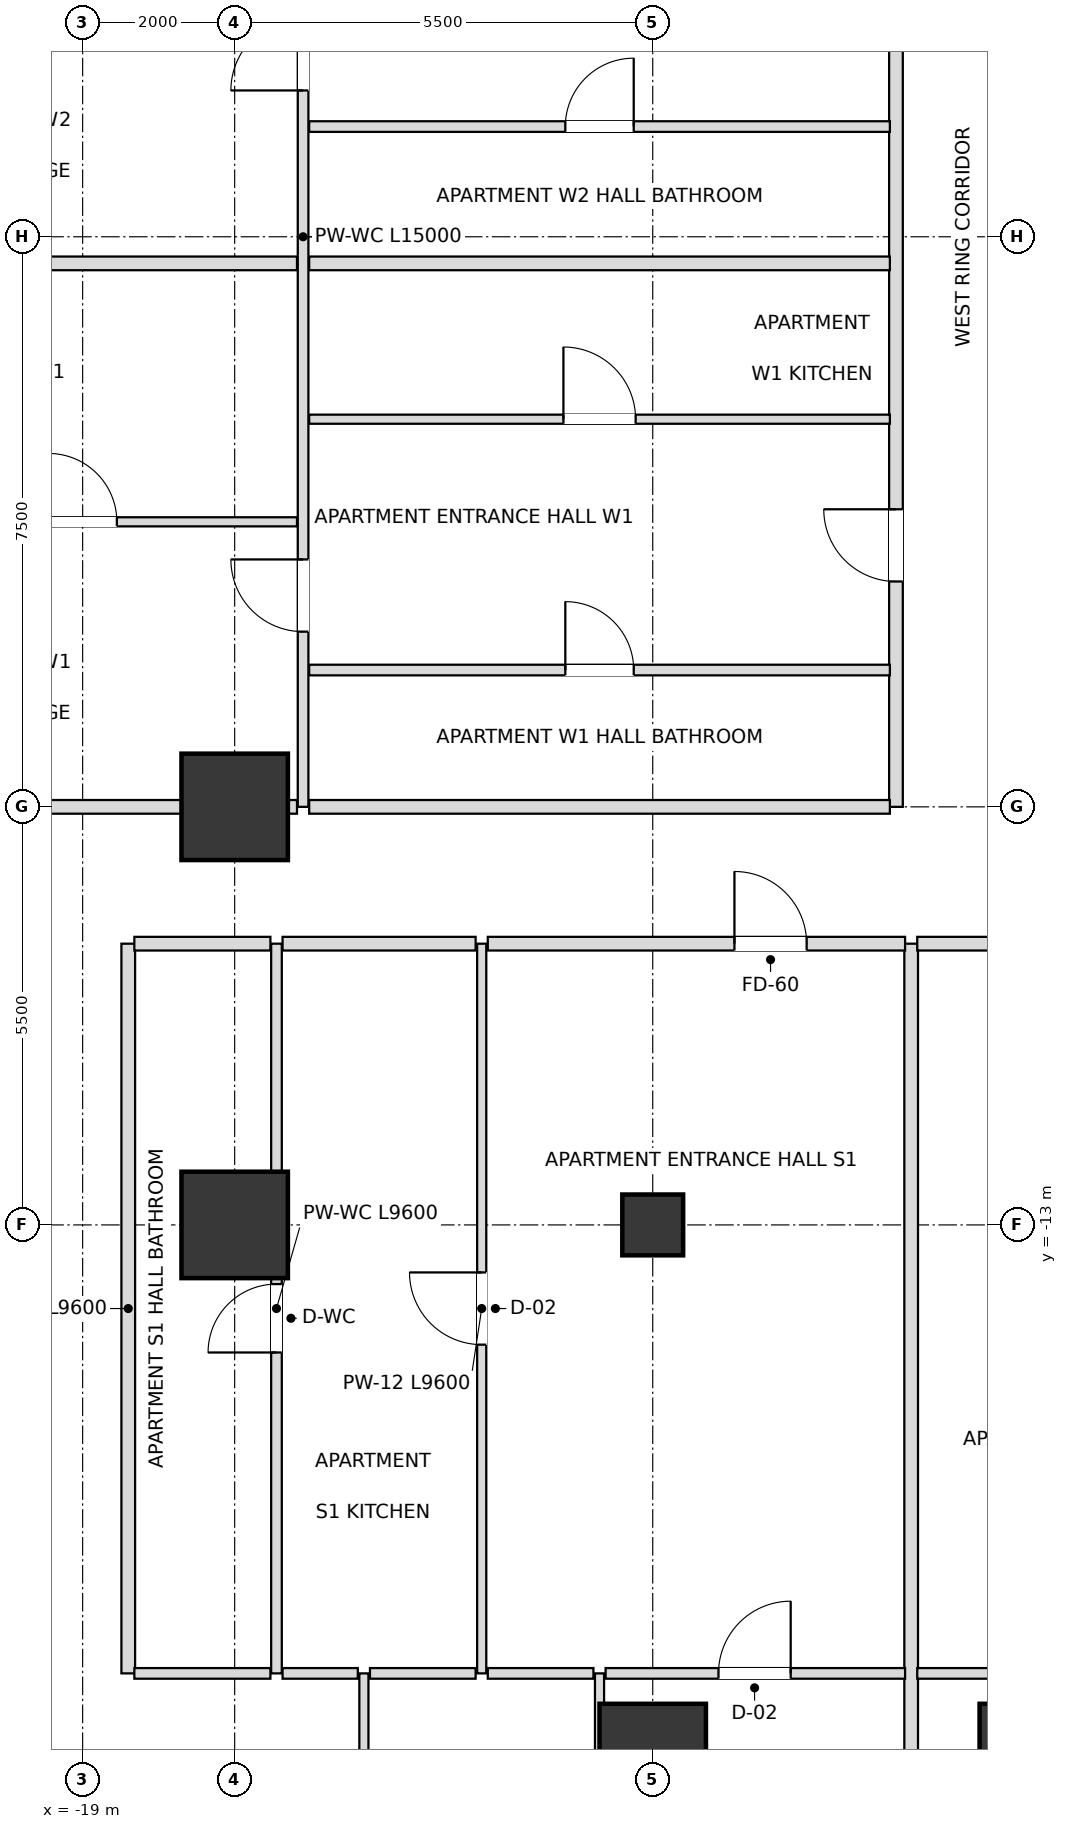
"""IFC4 building model, lengths in metres.
Left out: names, types, materials, properties, quantities, classifications, styles, units other than length and angle.
Written with IfcOpenShell. Run it as: python <this file> out.ifc"""

import sys

from ifc_helpers import new_model, si_unit, direction, frame, frame_2d, origin, origin_2d, place, context, subcontext, project, spatial, rectangle, extrude, element, fill, save


model = new_model("IFC4")
c1 = context("Model", 3, precision=1e-05, world=origin(), true_north=direction((0.0, 1.0)))
c2 = subcontext(c1, "Body", "Model", "MODEL_VIEW")
j1 = project(units=[si_unit("LENGTHUNIT", "METRE"), si_unit("PLANEANGLEUNIT", "RADIAN")], contexts=[c1])
p1 = place(None, origin())
s1 = spatial("IfcSite", under=j1, at=p1, CompositionType="ELEMENT")
p2 = place(p1, origin())
s2 = spatial("IfcBuilding", under=s1, at=p2, CompositionType="ELEMENT")
p3 = place(p2, frame((0.0, 0.0, 32.4)))
s3 = spatial("IfcBuildingStorey", under=s2, at=p3, CompositionType="ELEMENT", Elevation=32.4)
for number, where, z_axis, x_axis in (
    (1, (-11.5, -20.0, 0.0), (0.0, 0.0, 1.0), (1.0, 0.0, 0.0)),
    (2, (-6.5, -20.0, 0.0), (0.0, 0.0, 1.0), (1.0, 0.0, 0.0)),
    (3, (-17.0, -7.5, 0.0), (0.0, 0.0, 1.0), (1.0, 0.0, 0.0)),
    (4, (-17.0, -13.0, 0.0), (0.0, 0.0, 1.0), (1.0, 0.0, 0.0)),
):
    element("IfcColumn", number, at=place(p3, frame(where, z_axis=z_axis, x_axis=x_axis)), inside=s3, PredefinedType="USERDEFINED", context=c2, shape_type="SweptSolid", body=[
        extrude(rectangle(XDim=1.4, YDim=1.4, at=origin_2d()), origin(), (0.0, 0.0, 1.0), 3.6),
    ])
p4 = place(p3, frame((-11.5, -13.0, 0.0), z_axis=(0.0, 0.0, 1.0), x_axis=(1.0, 0.0, 0.0)))
e5 = element("IfcColumn", 5, at=p4, inside=s3, PredefinedType="COLUMN", context=c2, shape_type="SweptSolid", body=[
    extrude(rectangle(XDim=0.8, YDim=0.8, at=origin_2d()), origin(), (0.0, 0.0, 1.0), 3.6),
])
p5 = place(p3, frame((-18.4, -18.9, 0.0), z_axis=(0.0, 0.0, 1.0), x_axis=(0.0, 1.0, 0.0)))
e6 = element("IfcWall", 6, at=p5, inside=s3, PredefinedType="PARTITIONING", context=c2, shape_type="SweptSolid", body=[
    extrude(rectangle(XDim=9.6, YDim=0.18, at=frame_2d((4.8, 0.0))), origin(), (0.0, 0.0, 1.0), 2.736),
])
p6 = place(p3, frame((-16.45, -18.9, 0.0), z_axis=(0.0, 0.0, 1.0), x_axis=(0.0, 1.0, 0.0)))
e7 = element("IfcWall", 7, at=p6, inside=s3, PredefinedType="PARTITIONING", context=c2, shape_type="SweptSolid", body=[
    extrude(rectangle(XDim=9.6, YDim=0.14, at=frame_2d((4.8, 0.0))), origin(), (0.0, 0.0, 1.0), 2.736),
])
p7 = place(p6, frame((4.222, 0.0, 0.0)))
e8 = element("IfcOpeningElement", 8, at=p7, cuts=e7, PredefinedType="OPENING", context=c2, shape_type="SweptSolid", body=[
    extrude(rectangle(XDim=0.9, YDim=2.1, at=frame_2d((0.45, 1.05))), frame((0.0, 0.08, 0.0), z_axis=(0.0, -1.0, 0.0), x_axis=(1.0, 0.0, 0.0)), (0.0, 0.0, 1.0), 0.16),
])
p8 = place(p3, frame((-16.1, -7.5, 0.0), z_axis=(0.0, 0.0, 1.0), x_axis=(0.0, 1.0, 0.0)))
e9 = element("IfcWall", 9, at=p8, inside=s3, PredefinedType="PARTITIONING", context=c2, shape_type="SweptSolid", body=[
    extrude(rectangle(XDim=15.0, YDim=0.14, at=frame_2d((7.5, 0.0))), origin(), (0.0, 0.0, 1.0), 3.38),
])
p9 = place(p8, frame((2.305, 0.0, 0.0)))
e10 = element("IfcOpeningElement", 10, at=p9, cuts=e9, PredefinedType="OPENING", context=c2, shape_type="SweptSolid", body=[
    extrude(rectangle(XDim=0.95, YDim=2.1, at=frame_2d((0.475, 1.05))), frame((0.0, 0.08, 0.0), z_axis=(0.0, -1.0, 0.0), x_axis=(1.0, 0.0, 0.0)), (0.0, 0.0, 1.0), 0.16),
])
p10 = place(p8, frame((9.425, 0.0, 0.0)))
e11 = element("IfcOpeningElement", 11, at=p10, cuts=e9, PredefinedType="OPENING", context=c2, shape_type="SweptSolid", body=[
    extrude(rectangle(XDim=0.95, YDim=2.1, at=frame_2d((0.475, 1.05))), frame((0.0, 0.08, 0.0), z_axis=(0.0, -1.0, 0.0), x_axis=(1.0, 0.0, 0.0)), (0.0, 0.0, 1.0), 0.16),
])
p11 = place(p3, frame((-15.3, -24.9, 0.0), z_axis=(0.0, 0.0, 1.0), x_axis=(0.0, 1.0, 0.0)))
e12 = element("IfcWall", 12, at=p11, inside=s3, PredefinedType="PARTITIONING", context=c2, shape_type="SweptSolid", body=[
    extrude(rectangle(XDim=6.0, YDim=0.12, at=frame_2d((3.0, 0.0))), origin(), (0.0, 0.0, 1.0), 2.736),
])
p12 = place(p11, frame((2.55, 0.0, 0.0)))
e13 = element("IfcOpeningElement", 13, at=p12, cuts=e12, PredefinedType="OPENING", context=c2, shape_type="SweptSolid", body=[
    extrude(rectangle(XDim=0.9, YDim=2.1, at=frame_2d((0.45, 1.05))), frame((0.0, 0.07, 0.0), z_axis=(0.0, -1.0, 0.0), x_axis=(1.0, 0.0, 0.0)), (0.0, 0.0, 1.0), 0.14),
])
p13 = place(p3, frame((-13.75, -18.9, 0.0), z_axis=(0.0, 0.0, 1.0), x_axis=(0.0, 1.0, 0.0)))
e14 = element("IfcWall", 14, at=p13, inside=s3, PredefinedType="PARTITIONING", context=c2, shape_type="SweptSolid", body=[
    extrude(rectangle(XDim=9.6, YDim=0.12, at=frame_2d((4.8, 0.0))), origin(), (0.0, 0.0, 1.0), 2.736),
])
p14 = place(p13, frame((4.325, 0.0, 0.0)))
e15 = element("IfcOpeningElement", 15, at=p14, cuts=e14, PredefinedType="OPENING", context=c2, shape_type="SweptSolid", body=[
    extrude(rectangle(XDim=0.95, YDim=2.1, at=frame_2d((0.475, 1.05))), frame((0.0, 0.07, 0.0), z_axis=(0.0, -1.0, 0.0), x_axis=(1.0, 0.0, 0.0)), (0.0, 0.0, 1.0), 0.14),
])
p15 = place(p3, frame((-12.2, -24.9, 0.0), z_axis=(0.0, 0.0, 1.0), x_axis=(0.0, 1.0, 0.0)))
e16 = element("IfcWall", 16, at=p15, inside=s3, PredefinedType="PARTITIONING", context=c2, shape_type="SweptSolid", body=[
    extrude(rectangle(XDim=6.0, YDim=0.12, at=frame_2d((3.0, 0.0))), origin(), (0.0, 0.0, 1.0), 2.736),
])
p16 = place(p15, frame((2.55, 0.0, 0.0)))
e17 = element("IfcOpeningElement", 17, at=p16, cuts=e16, PredefinedType="OPENING", context=c2, shape_type="SweptSolid", body=[
    extrude(rectangle(XDim=0.9, YDim=2.1, at=frame_2d((0.45, 1.05))), frame((0.0, 0.07, 0.0), z_axis=(0.0, -1.0, 0.0), x_axis=(1.0, 0.0, 0.0)), (0.0, 0.0, 1.0), 0.14),
])
p17 = place(p3, frame((-8.3, -7.5, 0.0), z_axis=(0.0, 0.0, 1.0), x_axis=(0.0, 1.0, 0.0)))
e18 = element("IfcWall", 18, at=p17, inside=s3, PredefinedType="PARTITIONING", context=c2, shape_type="SweptSolid", body=[
    extrude(rectangle(XDim=15.0, YDim=0.18, at=frame_2d((7.5, 0.0))), origin(), (0.0, 0.0, 1.0), 3.38),
])
p18 = place(p17, frame((2.965, 0.0, 0.0)))
e19 = element("IfcOpeningElement", 19, at=p18, cuts=e18, PredefinedType="OPENING", context=c2, shape_type="SweptSolid", body=[
    extrude(rectangle(XDim=0.95, YDim=2.15, at=frame_2d((0.475, 1.075))), frame((0.0, 0.1, 0.0), z_axis=(0.0, -1.0, 0.0), x_axis=(1.0, 0.0, 0.0)), (0.0, 0.0, 1.0), 0.2),
])
p19 = place(p17, frame((10.465, 0.0, 0.0)))
e20 = element("IfcOpeningElement", 20, at=p19, cuts=e18, PredefinedType="OPENING", context=c2, shape_type="SweptSolid", body=[
    extrude(rectangle(XDim=0.95, YDim=2.15, at=frame_2d((0.475, 1.075))), frame((0.0, 0.1, 0.0), z_axis=(0.0, -1.0, 0.0), x_axis=(1.0, 0.0, 0.0)), (0.0, 0.0, 1.0), 0.2),
])
p20 = place(p3, frame((-8.1, -24.9, 0.0), z_axis=(0.0, 0.0, 1.0), x_axis=(0.0, 1.0, 0.0)))
e21 = element("IfcWall", 21, at=p20, inside=s3, PredefinedType="PARTITIONING", context=c2, shape_type="SweptSolid", body=[
    extrude(rectangle(XDim=15.6, YDim=0.18, at=frame_2d((7.8, 0.0))), origin(), (0.0, 0.0, 1.0), 2.816),
])
p21 = place(p3, frame((-18.32, -18.9, 0.0), z_axis=(0.0, 0.0, 1.0), x_axis=(1.0, 0.0, 0.0)))
e22 = element("IfcWall", 22, at=p21, inside=s3, PredefinedType="PARTITIONING", context=c2, shape_type="SweptSolid", body=[
    extrude(rectangle(XDim=1.79, YDim=0.14, at=frame_2d((0.895, 0.0))), origin(), (0.0, 0.0, 1.0), 2.736),
])
p22 = place(p3, frame((-16.37, -18.9, 0.0), z_axis=(0.0, 0.0, 1.0), x_axis=(1.0, 0.0, 0.0)))
e23 = element("IfcWall", 23, at=p22, inside=s3, PredefinedType="PARTITIONING", context=c2, shape_type="SweptSolid", body=[
    extrude(rectangle(XDim=0.99, YDim=0.14, at=frame_2d((0.495, 0.0))), origin(), (0.0, 0.0, 1.0), 2.736),
])
for number, where, z_axis, x_axis in (
    (24, (-15.22, -18.9, 0.0), (0.0, 0.0, 1.0), (1.0, 0.0, 0.0)),
    (25, (-13.67, -18.9, 0.0), (0.0, 0.0, 1.0), (1.0, 0.0, 0.0)),
):
    element("IfcWall", number, at=place(p3, frame(where, z_axis=z_axis, x_axis=x_axis)), inside=s3, PredefinedType="PARTITIONING", context=c2, shape_type="SweptSolid", body=[
        extrude(rectangle(XDim=1.39, YDim=0.14, at=frame_2d((0.695, 0.0))), origin(), (0.0, 0.0, 1.0), 2.736),
    ])
p23 = place(p3, frame((-12.12, -18.9, 0.0), z_axis=(0.0, 0.0, 1.0), x_axis=(1.0, 0.0, 0.0)))
e26 = element("IfcWall", 26, at=p23, inside=s3, PredefinedType="PARTITIONING", context=c2, shape_type="SweptSolid", body=[
    extrude(rectangle(XDim=3.94, YDim=0.14, at=frame_2d((1.97, 0.0))), origin(), (0.0, 0.0, 1.0), 2.736),
])
p24 = place(p23, frame((1.485, 0.0, 0.0)))
e27 = element("IfcOpeningElement", 27, at=p24, cuts=e26, PredefinedType="OPENING", context=c2, shape_type="SweptSolid", body=[
    extrude(rectangle(XDim=0.95, YDim=2.1, at=frame_2d((0.475, 1.05))), frame((0.0, 0.08, 0.0), z_axis=(0.0, -1.0, 0.0), x_axis=(1.0, 0.0, 0.0)), (0.0, 0.0, 1.0), 0.16),
])
p25 = place(p3, frame((-8.02, -18.9, 0.0), z_axis=(0.0, 0.0, 1.0), x_axis=(1.0, 0.0, 0.0)))
e28 = element("IfcWall", 28, at=p25, inside=s3, PredefinedType="PARTITIONING", context=c2, shape_type="SweptSolid", body=[
    extrude(rectangle(XDim=4.04, YDim=0.14, at=frame_2d((2.02, 0.0))), origin(), (0.0, 0.0, 1.0), 2.816),
])
p26 = place(p25, frame((2.452, 0.0, 0.0)))
e29 = element("IfcOpeningElement", 29, at=p26, cuts=e28, PredefinedType="OPENING", context=c2, shape_type="SweptSolid", body=[
    extrude(rectangle(XDim=0.95, YDim=2.1, at=frame_2d((0.475, 1.05))), frame((0.0, 0.08, 0.0), z_axis=(0.0, -1.0, 0.0), x_axis=(1.0, 0.0, 0.0)), (0.0, 0.0, 1.0), 0.16),
])
p27 = place(p3, frame((-18.32, -9.3, 0.0), z_axis=(0.0, 0.0, 1.0), x_axis=(1.0, 0.0, 0.0)))
e30 = element("IfcWall", 30, at=p27, inside=s3, PredefinedType="PARTITIONING", context=c2, shape_type="SweptSolid", body=[
    extrude(rectangle(XDim=1.79, YDim=0.18, at=frame_2d((0.895, 0.0))), origin(), (0.0, 0.0, 1.0), 2.816),
])
p28 = place(p3, frame((-16.37, -9.3, 0.0), z_axis=(0.0, 0.0, 1.0), x_axis=(1.0, 0.0, 0.0)))
e31 = element("IfcWall", 31, at=p28, inside=s3, PredefinedType="PARTITIONING", context=c2, shape_type="SweptSolid", body=[
    extrude(rectangle(XDim=2.54, YDim=0.18, at=frame_2d((1.27, 0.0))), origin(), (0.0, 0.0, 1.0), 3.38),
])
p29 = place(p3, frame((-13.67, -9.3, 0.0), z_axis=(0.0, 0.0, 1.0), x_axis=(1.0, 0.0, 0.0)))
e32 = element("IfcWall", 32, at=p29, inside=s3, PredefinedType="PARTITIONING", context=c2, shape_type="SweptSolid", body=[
    extrude(rectangle(XDim=5.49, YDim=0.18, at=frame_2d((2.745, 0.0))), origin(), (0.0, 0.0, 1.0), 3.38),
])
p30 = place(p29, frame((3.245, 0.0, 0.0)))
e33 = element("IfcOpeningElement", 33, at=p30, cuts=e32, PredefinedType="OPENING", context=c2, shape_type="SweptSolid", body=[
    extrude(rectangle(XDim=0.95, YDim=2.15, at=frame_2d((0.475, 1.075))), frame((0.0, 0.1, 0.0), z_axis=(0.0, -1.0, 0.0), x_axis=(1.0, 0.0, 0.0)), (0.0, 0.0, 1.0), 0.2),
])
p31 = place(p3, frame((-8.02, -9.3, 0.0), z_axis=(0.0, 0.0, 1.0), x_axis=(1.0, 0.0, 0.0)))
e34 = element("IfcWall", 34, at=p31, inside=s3, PredefinedType="PARTITIONING", context=c2, shape_type="SweptSolid", body=[
    extrude(rectangle(XDim=4.04, YDim=0.18, at=frame_2d((2.02, 0.0))), origin(), (0.0, 0.0, 1.0), 2.816),
])
p32 = place(p31, frame((1.545, 0.0, 0.0)))
e35 = element("IfcOpeningElement", 35, at=p32, cuts=e34, PredefinedType="OPENING", context=c2, shape_type="SweptSolid", body=[
    extrude(rectangle(XDim=0.95, YDim=2.15, at=frame_2d((0.475, 1.075))), frame((0.0, 0.1, 0.0), z_axis=(0.0, -1.0, 0.0), x_axis=(1.0, 0.0, 0.0)), (0.0, 0.0, 1.0), 0.2),
])
p33 = place(p3, frame((-21.9, -7.5, 0.0), z_axis=(0.0, 0.0, 1.0), x_axis=(1.0, 0.0, 0.0)))
e36 = element("IfcWall", 36, at=p33, inside=s3, PredefinedType="PARTITIONING", context=c2, shape_type="SweptSolid", body=[
    extrude(rectangle(XDim=5.72, YDim=0.18, at=frame_2d((2.86, 0.0))), origin(), (0.0, 0.0, 1.0), 2.816),
])
p34 = place(p3, frame((-16.02, -7.5, 0.0), z_axis=(0.0, 0.0, 1.0), x_axis=(1.0, 0.0, 0.0)))
e37 = element("IfcWall", 37, at=p34, inside=s3, PredefinedType="PARTITIONING", context=c2, shape_type="SweptSolid", body=[
    extrude(rectangle(XDim=7.64, YDim=0.18, at=frame_2d((3.82, 0.0))), origin(), (0.0, 0.0, 1.0), 2.816),
])
p35 = place(p3, frame((-16.02, -5.7, 0.0), z_axis=(0.0, 0.0, 1.0), x_axis=(1.0, 0.0, 0.0)))
e38 = element("IfcWall", 38, at=p35, inside=s3, PredefinedType="PARTITIONING", context=c2, shape_type="SweptSolid", body=[
    extrude(rectangle(XDim=7.64, YDim=0.14, at=frame_2d((3.82, 0.0))), origin(), (0.0, 0.0, 1.0), 2.948),
])
p36 = place(p35, frame((3.37, 0.0, 0.0)))
e39 = element("IfcOpeningElement", 39, at=p36, cuts=e38, PredefinedType="OPENING", context=c2, shape_type="SweptSolid", body=[
    extrude(rectangle(XDim=0.9, YDim=2.1, at=frame_2d((0.45, 1.05))), frame((0.0, 0.08, 0.0), z_axis=(0.0, -1.0, 0.0), x_axis=(1.0, 0.0, 0.0)), (0.0, 0.0, 1.0), 0.16),
])
p37 = place(p3, frame((-21.82, -3.75, 0.0), z_axis=(0.0, 0.0, 1.0), x_axis=(1.0, 0.0, 0.0)))
e40 = element("IfcWall", 40, at=p37, inside=s3, PredefinedType="PARTITIONING", context=c2, shape_type="SweptSolid", body=[
    extrude(rectangle(XDim=5.64, YDim=0.12, at=frame_2d((2.82, 0.0))), origin(), (0.0, 0.0, 1.0), 2.816),
])
p38 = place(p37, frame((2.37, 0.0, 0.0)))
e41 = element("IfcOpeningElement", 41, at=p38, cuts=e40, PredefinedType="OPENING", context=c2, shape_type="SweptSolid", body=[
    extrude(rectangle(XDim=0.9, YDim=2.1, at=frame_2d((0.45, 1.05))), frame((0.0, 0.07, 0.0), z_axis=(0.0, -1.0, 0.0), x_axis=(1.0, 0.0, 0.0)), (0.0, 0.0, 1.0), 0.14),
])
p39 = place(p3, frame((-16.02, -2.4, 0.0), z_axis=(0.0, 0.0, 1.0), x_axis=(1.0, 0.0, 0.0)))
e42 = element("IfcWall", 42, at=p39, inside=s3, PredefinedType="PARTITIONING", context=c2, shape_type="SweptSolid", body=[
    extrude(rectangle(XDim=7.64, YDim=0.12, at=frame_2d((3.82, 0.0))), origin(), (0.0, 0.0, 1.0), 2.948),
])
p40 = place(p39, frame((3.345, 0.0, 0.0)))
e43 = element("IfcOpeningElement", 43, at=p40, cuts=e42, PredefinedType="OPENING", context=c2, shape_type="SweptSolid", body=[
    extrude(rectangle(XDim=0.95, YDim=2.1, at=frame_2d((0.475, 1.05))), frame((0.0, 0.07, 0.0), z_axis=(0.0, -1.0, 0.0), x_axis=(1.0, 0.0, 0.0)), (0.0, 0.0, 1.0), 0.14),
])
p41 = place(p3, frame((-21.82, -0.35, 0.0), z_axis=(0.0, 0.0, 1.0), x_axis=(1.0, 0.0, 0.0)))
e44 = element("IfcWall", 44, at=p41, inside=s3, PredefinedType="PARTITIONING", context=c2, shape_type="SweptSolid", body=[
    extrude(rectangle(XDim=5.64, YDim=0.18, at=frame_2d((2.82, 0.0))), origin(), (0.0, 0.0, 1.0), 2.816),
])
p42 = place(p3, frame((-16.02, -0.35, 0.0), z_axis=(0.0, 0.0, 1.0), x_axis=(1.0, 0.0, 0.0)))
e45 = element("IfcWall", 45, at=p42, inside=s3, PredefinedType="PARTITIONING", context=c2, shape_type="SweptSolid", body=[
    extrude(rectangle(XDim=7.64, YDim=0.18, at=frame_2d((3.82, 0.0))), origin(), (0.0, 0.0, 1.0), 2.948),
])
p43 = place(p3, frame((-16.02, 1.45, 0.0), z_axis=(0.0, 0.0, 1.0), x_axis=(1.0, 0.0, 0.0)))
e46 = element("IfcWall", 46, at=p43, inside=s3, PredefinedType="PARTITIONING", context=c2, shape_type="SweptSolid", body=[
    extrude(rectangle(XDim=7.64, YDim=0.14, at=frame_2d((3.82, 0.0))), origin(), (0.0, 0.0, 1.0), 2.948),
])
p44 = place(p43, frame((3.37, 0.0, 0.0)))
e47 = element("IfcOpeningElement", 47, at=p44, cuts=e46, PredefinedType="OPENING", context=c2, shape_type="SweptSolid", body=[
    extrude(rectangle(XDim=0.9, YDim=2.1, at=frame_2d((0.45, 1.05))), frame((0.0, 0.08, 0.0), z_axis=(0.0, -1.0, 0.0), x_axis=(1.0, 0.0, 0.0)), (0.0, 0.0, 1.0), 0.16),
])
p45 = place(p30, origin())
e48 = element("IfcDoor", 48, at=p45, inside=s3, OperationType="SINGLE_SWING_LEFT", PredefinedType="DOOR", context=c2, shape_type="SweptSolid", body=[
    extrude(rectangle(XDim=0.95, YDim=2.15, at=frame_2d((0.475, 1.075))), frame((0.0, 0.025, 0.0), z_axis=(0.0, -1.0, 0.0), x_axis=(1.0, 0.0, 0.0)), (0.0, 0.0, 1.0), 0.05),
])
fill(e33, e48)
p46 = place(p14, origin())
e49 = element("IfcDoor", 49, at=p46, inside=s3, OperationType="SINGLE_SWING_RIGHT", PredefinedType="DOOR", context=c2, shape_type="SweptSolid", body=[
    extrude(rectangle(XDim=0.95, YDim=2.1, at=frame_2d((0.475, 1.05))), frame((0.0, 0.025, 0.0), z_axis=(0.0, -1.0, 0.0), x_axis=(1.0, 0.0, 0.0)), (0.0, 0.0, 1.0), 0.05),
])
fill(e15, e49)
p47 = place(p7, origin())
e50 = element("IfcDoor", 50, at=p47, inside=s3, OperationType="SINGLE_SWING_LEFT", PredefinedType="DOOR", context=c2, shape_type="SweptSolid", body=[
    extrude(rectangle(XDim=0.9, YDim=2.1, at=frame_2d((0.45, 1.05))), frame((0.0, 0.025, 0.0), z_axis=(0.0, -1.0, 0.0), x_axis=(1.0, 0.0, 0.0)), (0.0, 0.0, 1.0), 0.05),
])
fill(e8, e50)
p48 = place(p24, origin())
e51 = element("IfcDoor", 51, at=p48, inside=s3, OperationType="SINGLE_SWING_RIGHT", PredefinedType="DOOR", context=c2, shape_type="SweptSolid", body=[
    extrude(rectangle(XDim=0.95, YDim=2.1, at=frame_2d((0.475, 1.05))), frame((0.0, 0.025, 0.0), z_axis=(0.0, -1.0, 0.0), x_axis=(1.0, 0.0, 0.0)), (0.0, 0.0, 1.0), 0.05),
])
fill(e27, e51)
p49 = place(p36, origin())
e52 = element("IfcDoor", 52, at=p49, inside=s3, OperationType="SINGLE_SWING_LEFT", PredefinedType="DOOR", context=c2, shape_type="SweptSolid", body=[
    extrude(rectangle(XDim=0.9, YDim=2.1, at=frame_2d((0.45, 1.05))), frame((0.0, 0.025, 0.0), z_axis=(0.0, -1.0, 0.0), x_axis=(1.0, 0.0, 0.0)), (0.0, 0.0, 1.0), 0.05),
])
fill(e39, e52)
p50 = place(p18, origin())
e53 = element("IfcDoor", 53, at=p50, inside=s3, OperationType="SINGLE_SWING_RIGHT", PredefinedType="DOOR", context=c2, shape_type="SweptSolid", body=[
    extrude(rectangle(XDim=0.95, YDim=2.15, at=frame_2d((0.475, 1.075))), frame((0.0, 0.025, 0.0), z_axis=(0.0, -1.0, 0.0), x_axis=(1.0, 0.0, 0.0)), (0.0, 0.0, 1.0), 0.05),
])
fill(e19, e53)
p51 = place(p40, origin())
e54 = element("IfcDoor", 54, at=p51, inside=s3, OperationType="SINGLE_SWING_LEFT", PredefinedType="DOOR", context=c2, shape_type="SweptSolid", body=[
    extrude(rectangle(XDim=0.95, YDim=2.1, at=frame_2d((0.475, 1.05))), frame((0.0, 0.025, 0.0), z_axis=(0.0, -1.0, 0.0), x_axis=(1.0, 0.0, 0.0)), (0.0, 0.0, 1.0), 0.05),
])
fill(e43, e54)
p52 = place(p9, origin())
e55 = element("IfcDoor", 55, at=p52, inside=s3, OperationType="SINGLE_SWING_RIGHT", PredefinedType="DOOR", context=c2, shape_type="SweptSolid", body=[
    extrude(rectangle(XDim=0.95, YDim=2.1, at=frame_2d((0.475, 1.05))), frame((0.0, 0.025, 0.0), z_axis=(0.0, -1.0, 0.0), x_axis=(1.0, 0.0, 0.0)), (0.0, 0.0, 1.0), 0.05),
])
fill(e10, e55)
p53 = place(p38, origin())
e56 = element("IfcDoor", 56, at=p53, inside=s3, OperationType="SINGLE_SWING_LEFT", PredefinedType="DOOR", context=c2, shape_type="SweptSolid", body=[
    extrude(rectangle(XDim=0.9, YDim=2.1, at=frame_2d((0.45, 1.05))), frame((0.0, 0.025, 0.0), z_axis=(0.0, -1.0, 0.0), x_axis=(1.0, 0.0, 0.0)), (0.0, 0.0, 1.0), 0.05),
])
fill(e41, e56)
p54 = place(p44, origin())
e57 = element("IfcDoor", 57, at=p54, inside=s3, OperationType="SINGLE_SWING_RIGHT", PredefinedType="DOOR", context=c2, shape_type="SweptSolid", body=[
    extrude(rectangle(XDim=0.9, YDim=2.1, at=frame_2d((0.45, 1.05))), frame((0.0, 0.025, 0.0), z_axis=(0.0, -1.0, 0.0), x_axis=(1.0, 0.0, 0.0)), (0.0, 0.0, 1.0), 0.05),
])
fill(e47, e57)
p55 = place(p10, origin())
e58 = element("IfcDoor", 58, at=p55, inside=s3, OperationType="SINGLE_SWING_LEFT", PredefinedType="DOOR", context=c2, shape_type="SweptSolid", body=[
    extrude(rectangle(XDim=0.95, YDim=2.1, at=frame_2d((0.475, 1.05))), frame((0.0, 0.025, 0.0), z_axis=(0.0, -1.0, 0.0), x_axis=(1.0, 0.0, 0.0)), (0.0, 0.0, 1.0), 0.05),
])
fill(e11, e58)
save(model, sys.argv[1])
